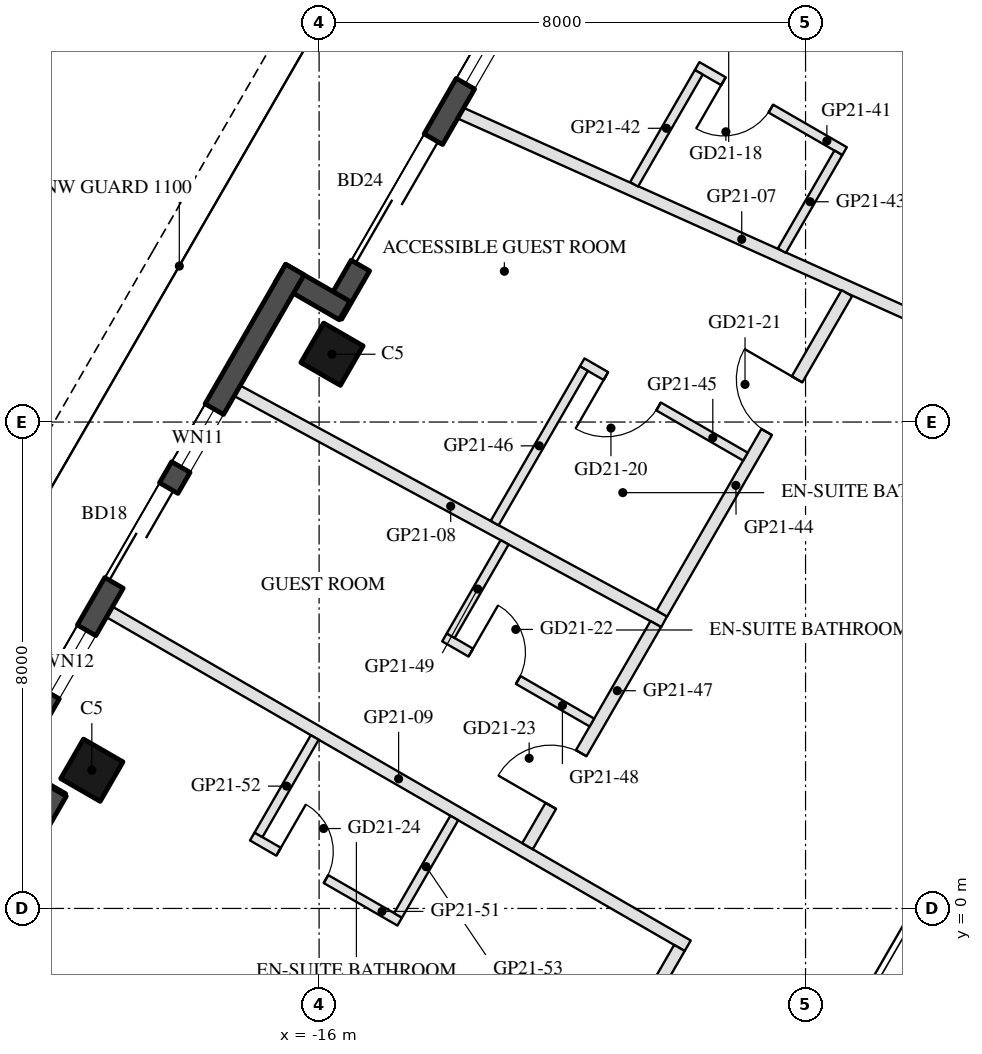
"""IFC4 building model, lengths in metres.
Left out: names, types, materials, properties, quantities, classifications, styles, units other than length and angle.
Written with IfcOpenShell. Run it as: python <this file> out.ifc"""

import sys

from ifc_helpers import new_model, si_unit, direction, frame, frame_2d, origin, origin_2d, place, context, subcontext, project, spatial, rectangle, hollow_rectangle, extrude, element, fill, save


model = new_model("IFC4")
c1 = context("Model", 3, precision=1e-05, world=origin(), true_north=direction((0.0, 1.0)))
c2 = subcontext(c1, "Body", "Model", "MODEL_VIEW")
j1 = project(units=[si_unit("LENGTHUNIT", "METRE"), si_unit("PLANEANGLEUNIT", "RADIAN")], contexts=[c1])
p1 = place(None, origin())
s1 = spatial("IfcSite", under=j1, at=p1, CompositionType="ELEMENT")
p2 = place(p1, origin())
s2 = spatial("IfcBuilding", under=s1, at=p2, CompositionType="ELEMENT")
p3 = place(p2, frame((0.0, 0.0, 216.9)))
s3 = spatial("IfcBuildingStorey", under=s2, at=p3, CompositionType="ELEMENT", Elevation=216.9)
for number, where, z_axis, x_axis in (
    (1, (-15.788, 9.115, 0.0), (0.0, 0.0, 1.0), (0.5, 0.866, 0.0)),
    (2, (-19.738, 2.273, 0.0), (0.0, 0.0, 1.0), (0.5, 0.866, 0.0)),
):
    element("IfcColumn", number, at=place(p3, frame(where, z_axis=z_axis, x_axis=x_axis)), inside=s3, PredefinedType="COLUMN", context=c2, shape_type="SweptSolid", body=[
        extrude(hollow_rectangle(XDim=0.75, YDim=0.75, WallThickness=0.035, at=origin_2d()), origin(), (0.0, 0.0, 1.0), 3.7),
    ])
p4 = place(p3, frame((-12.409, 15.617, 0.0), z_axis=(0.0, 0.0, 1.0), x_axis=(-0.500003597184, -0.866023326939, 0.0)))
e3 = element("IfcWall", 3, at=p4, inside=s3, PredefinedType="SOLIDWALL", context=c2, shape_type="SweptSolid", body=[
    extrude(rectangle(XDim=6.74, YDim=0.35, at=frame_2d((3.37, 0.0))), origin(), (0.0, 0.0, 1.0), 3.55),
])
p5 = place(p4, frame((0.77, 0.0, 0.3)))
e4 = element("IfcOpeningElement", 4, at=p5, cuts=e3, PredefinedType="OPENING", context=c2, shape_type="SweptSolid", body=[
    extrude(rectangle(XDim=1.6, YDim=2.65, at=frame_2d((0.8, 1.325))), frame((0.0, 0.185, 0.0), z_axis=(0.0, -1.0, 0.0), x_axis=(1.0, 0.0, 0.0)), (0.0, 0.0, 1.0), 0.37),
])
p6 = place(p4, frame((3.424, 0.0, 0.0)))
e5 = element("IfcOpeningElement", 5, at=p6, cuts=e3, PredefinedType="OPENING", context=c2, shape_type="SweptSolid", body=[
    extrude(rectangle(XDim=2.4, YDim=2.4, at=frame_2d((1.2, 1.2))), frame((0.0, 0.185, 0.0), z_axis=(0.0, -1.0, 0.0), x_axis=(1.0, 0.0, 0.0)), (0.0, 0.0, 1.0), 0.37),
])
p7 = place(p3, frame((-15.581, 9.833, 0.0), z_axis=(0.0, 0.0, 1.0), x_axis=(-0.866055662726, 0.499947586314, 0.0)))
e6 = element("IfcWall", 6, at=p7, inside=s3, PredefinedType="SOLIDWALL", context=c2, shape_type="SweptSolid", body=[
    extrude(rectangle(XDim=1.22, YDim=0.35, at=frame_2d((0.61, 0.0))), origin(), (0.0, 0.0, 1.0), 3.55),
])
p8 = place(p3, frame((-16.398, 10.507, 0.0), z_axis=(0.0, 0.0, 1.0), x_axis=(-0.499999142773, -0.866025898704, 0.0)))
e7 = element("IfcWall", 7, at=p8, inside=s3, PredefinedType="SOLIDWALL", context=c2, shape_type="SweptSolid", body=[
    extrude(rectangle(XDim=9.7, YDim=0.35, at=frame_2d((4.85, 0.0))), origin(), (0.0, 0.0, 1.0), 3.55),
])
p9 = place(p8, frame((4.149, 0.0, 0.0)))
e8 = element("IfcOpeningElement", 8, at=p9, cuts=e7, PredefinedType="OPENING", context=c2, shape_type="SweptSolid", body=[
    extrude(rectangle(XDim=1.8, YDim=2.4, at=frame_2d((0.9, 1.2))), frame((0.0, 0.185, 0.0), z_axis=(0.0, -1.0, 0.0), x_axis=(1.0, 0.0, 0.0)), (0.0, 0.0, 1.0), 0.37),
])
p10 = place(p8, frame((2.65, 0.0, 0.3)))
e9 = element("IfcOpeningElement", 9, at=p10, cuts=e7, PredefinedType="OPENING", context=c2, shape_type="SweptSolid", body=[
    extrude(rectangle(XDim=1.1, YDim=2.65, at=frame_2d((0.55, 1.325))), frame((0.0, 0.185, 0.0), z_axis=(0.0, -1.0, 0.0), x_axis=(1.0, 0.0, 0.0)), (0.0, 0.0, 1.0), 0.37),
])
p11 = place(p8, frame((6.85, 0.0, 0.3)))
e10 = element("IfcOpeningElement", 10, at=p11, cuts=e7, PredefinedType="OPENING", context=c2, shape_type="SweptSolid", body=[
    extrude(rectangle(XDim=1.2, YDim=2.65, at=frame_2d((0.6, 1.325))), frame((0.0, 0.185, 0.0), z_axis=(0.0, -1.0, 0.0), x_axis=(1.0, 0.0, 0.0)), (0.0, 0.0, 1.0), 0.37),
])
p12 = place(p3, frame((-21.312, 2.346, 0.0), z_axis=(0.0, 0.0, 1.0), x_axis=(0.866005645448, -0.500034220881, 0.0)))
e11 = element("IfcWall", 11, at=p12, inside=s3, PredefinedType="SOLIDWALL", context=c2, shape_type="SweptSolid", body=[
    extrude(rectangle(XDim=1.22, YDim=0.35, at=frame_2d((0.61, 0.0))), origin(), (0.0, 0.0, 1.0), 3.55),
])
p13 = place(p3, frame((-20.309, 1.934, 0.0), z_axis=(0.0, 0.0, 1.0), x_axis=(-0.499992114976, -0.866029956157, 0.0)))
e12 = element("IfcWall", 12, at=p13, inside=s3, PredefinedType="SOLIDWALL", context=c2, shape_type="SweptSolid", body=[
    extrude(rectangle(XDim=6.74, YDim=0.35, at=frame_2d((3.37, 0.0))), origin(), (0.0, 0.0, 1.0), 3.55),
])
p14 = place(p13, frame((0.77, 0.0, 0.0)))
e13 = element("IfcOpeningElement", 13, at=p14, cuts=e12, PredefinedType="OPENING", context=c2, shape_type="SweptSolid", body=[
    extrude(rectangle(XDim=2.4, YDim=2.4, at=frame_2d((1.2, 1.2))), frame((0.0, 0.185, 0.0), z_axis=(0.0, -1.0, 0.0), x_axis=(1.0, 0.0, 0.0)), (0.0, 0.0, 1.0), 0.37),
])
p15 = place(p13, frame((3.47, 0.0, 0.3)))
e14 = element("IfcOpeningElement", 14, at=p15, cuts=e12, PredefinedType="OPENING", context=c2, shape_type="SweptSolid", body=[
    extrude(rectangle(XDim=2.9, YDim=2.65, at=frame_2d((1.45, 1.325))), frame((0.0, 0.185, 0.0), z_axis=(0.0, -1.0, 0.0), x_axis=(1.0, 0.0, 0.0)), (0.0, 0.0, 1.0), 0.37),
])
p16 = place(p3, frame((-13.672, 13.08, 0.0), z_axis=(0.0, 0.0, 1.0), x_axis=(0.912311972773, -0.409495866077, 0.0)))
e15 = element("IfcWall", 15, at=p16, inside=s3, PredefinedType="PARTITIONING", context=c2, shape_type="SweptSolid", body=[
    extrude(rectangle(XDim=10.132, YDim=0.2, at=frame_2d((5.066, 0.0))), origin(), (0.0, 0.0, 1.0), 3.06),
])
p17 = place(p3, frame((-17.347, 8.514, 0.0), z_axis=(0.0, 0.0, 1.0), x_axis=(0.879604495132, -0.475705720109, 0.0)))
e16 = element("IfcWall", 16, at=p17, inside=s3, PredefinedType="PARTITIONING", context=c2, shape_type="SweptSolid", body=[
    extrude(rectangle(XDim=7.983, YDim=0.2, at=frame_2d((3.992, 0.0))), origin(), (0.0, 0.0, 1.0), 3.06),
])
p18 = place(p3, frame((-19.447, 4.877, 0.0), z_axis=(0.0, 0.0, 1.0), x_axis=(0.866027479907, -0.499996404033, 0.0)))
e17 = element("IfcWall", 17, at=p18, inside=s3, PredefinedType="PARTITIONING", context=c2, shape_type="SweptSolid", body=[
    extrude(rectangle(XDim=10.98, YDim=0.2, at=frame_2d((5.49, 0.0))), origin(), (0.0, 0.0, 1.0), 3.06),
])
p19 = place(p3, frame((-7.358, 12.455, 0.0), z_axis=(0.0, 0.0, 1.0), x_axis=(-0.866034573852, 0.49998411664, 0.0)))
e18 = element("IfcWall", 18, at=p19, inside=s3, PredefinedType="PARTITIONING", context=c2, shape_type="SweptSolid", body=[
    extrude(rectangle(XDim=2.8, YDim=0.15, at=frame_2d((1.4, 0.0))), origin(), (0.0, 0.0, 1.0), 3.55),
])
p20 = place(p19, frame((1.4, 0.0, 0.0)))
e19 = element("IfcOpeningElement", 19, at=p20, cuts=e18, PredefinedType="OPENING", context=c2, shape_type="SweptSolid", body=[
    extrude(rectangle(XDim=0.9, YDim=2.1, at=frame_2d((0.45, 1.05))), frame((0.0, 0.085, 0.0), z_axis=(0.0, -1.0, 0.0), x_axis=(1.0, 0.0, 0.0)), (0.0, 0.0, 1.0), 0.17),
])
p21 = place(p3, frame((-9.756, 13.752, 0.0), z_axis=(0.0, 0.0, 1.0), x_axis=(-0.50001378257, -0.866017446268, 0.0)))
e20 = element("IfcWall", 20, at=p21, inside=s3, PredefinedType="PARTITIONING", context=c2, shape_type="SweptSolid", body=[
    extrude(rectangle(XDim=2.128, YDim=0.15, at=frame_2d((1.064, 0.0))), origin(), (0.0, 0.0, 1.0), 3.55),
])
p22 = place(p3, frame((-7.461, 12.427, 0.0), z_axis=(0.0, 0.0, 1.0), x_axis=(-0.500025795397, -0.866010510293, 0.0)))
e21 = element("IfcWall", 21, at=p22, inside=s3, PredefinedType="PARTITIONING", context=c2, shape_type="SweptSolid", body=[
    extrude(rectangle(XDim=1.858, YDim=0.15, at=frame_2d((0.929, 0.0))), origin(), (0.0, 0.0, 1.0), 3.55),
])
p23 = place(p3, frame((-10.363, 4.851, 0.0), z_axis=(0.0, 0.0, 1.0), x_axis=(0.50000147882, 0.866024549986, 0.0)))
e22 = element("IfcWall", 22, at=p23, inside=s3, PredefinedType="PARTITIONING", context=c2, shape_type="SweptSolid", body=[
    extrude(rectangle(XDim=6.084, YDim=0.2, at=frame_2d((3.042, 0.0))), origin(), (0.0, 0.0, 1.0), 2.95),
])
p24 = place(p23, frame((3.447, 0.0, 0.0)))
e23 = element("IfcOpeningElement", 23, at=p24, cuts=e22, PredefinedType="OPENING", context=c2, shape_type="SweptSolid", body=[
    extrude(rectangle(XDim=1.0, YDim=2.1, at=frame_2d((0.5, 1.05))), frame((0.0, 0.11, 0.0), z_axis=(0.0, -1.0, 0.0), x_axis=(1.0, 0.0, 0.0)), (0.0, 0.0, 1.0), 0.22),
])
p25 = place(p3, frame((-8.989, 7.431, 0.0), z_axis=(0.0, 0.0, 1.0), x_axis=(-0.86600983753, 0.500026960575, 0.0)))
e24 = element("IfcWall", 24, at=p25, inside=s3, PredefinedType="PARTITIONING", context=c2, shape_type="SweptSolid", body=[
    extrude(rectangle(XDim=3.1, YDim=0.15, at=frame_2d((1.55, 0.0))), origin(), (0.0, 0.0, 1.0), 3.55),
])
p26 = place(p25, frame((1.65, 0.0, 0.0)))
e25 = element("IfcOpeningElement", 25, at=p26, cuts=e24, PredefinedType="OPENING", context=c2, shape_type="SweptSolid", body=[
    extrude(rectangle(XDim=1.0, YDim=2.1, at=frame_2d((0.5, 1.05))), frame((0.0, 0.085, 0.0), z_axis=(0.0, -1.0, 0.0), x_axis=(1.0, 0.0, 0.0)), (0.0, 0.0, 1.0), 0.17),
])
p27 = place(p3, frame((-11.646, 8.879, 0.0), z_axis=(0.0, 0.0, 1.0), x_axis=(-0.499996155683, -0.86602762329, 0.0)))
e26 = element("IfcWall", 26, at=p27, inside=s3, PredefinedType="PARTITIONING", context=c2, shape_type="SweptSolid", body=[
    extrude(rectangle(XDim=2.934, YDim=0.15, at=frame_2d((1.467, 0.0))), origin(), (0.0, 0.0, 1.0), 2.95),
])
p28 = place(p3, frame((-12.573, 1.023, 0.0), z_axis=(0.0, 0.0, 1.0), x_axis=(0.499991256393, 0.86603045185, 0.0)))
e27 = element("IfcWall", 27, at=p28, inside=s3, PredefinedType="PARTITIONING", context=c2, shape_type="SweptSolid", body=[
    extrude(rectangle(XDim=4.219, YDim=0.2, at=frame_2d((2.11, 0.0))), origin(), (0.0, 0.0, 1.0), 2.95),
])
p29 = place(p28, frame((0.766, 0.0, 0.0)))
e28 = element("IfcOpeningElement", 28, at=p29, cuts=e27, PredefinedType="OPENING", context=c2, shape_type="SweptSolid", body=[
    extrude(rectangle(XDim=1.0, YDim=2.1, at=frame_2d((0.5, 1.05))), frame((0.0, 0.11, 0.0), z_axis=(0.0, -1.0, 0.0), x_axis=(1.0, 0.0, 0.0)), (0.0, 0.0, 1.0), 0.22),
])
p30 = place(p3, frame((-13.938, 4.458, 0.0), z_axis=(0.0, 0.0, 1.0), x_axis=(0.865996816683, -0.500049511043, 0.0)))
e29 = element("IfcWall", 29, at=p30, inside=s3, PredefinedType="PARTITIONING", context=c2, shape_type="SweptSolid", body=[
    extrude(rectangle(XDim=2.8, YDim=0.15, at=frame_2d((1.4, 0.0))), origin(), (0.0, 0.0, 1.0), 3.55),
])
p31 = place(p30, frame((0.5, 0.0, 0.0)))
e30 = element("IfcOpeningElement", 30, at=p31, cuts=e29, PredefinedType="OPENING", context=c2, shape_type="SweptSolid", body=[
    extrude(rectangle(XDim=0.9, YDim=2.1, at=frame_2d((0.45, 1.05))), frame((0.0, 0.085, 0.0), z_axis=(0.0, -1.0, 0.0), x_axis=(1.0, 0.0, 0.0)), (0.0, 0.0, 1.0), 0.17),
])
p32 = place(p3, frame((-12.949, 6.022, 0.0), z_axis=(0.0, 0.0, 1.0), x_axis=(-0.499913039621, -0.866075604562, 0.0)))
e31 = element("IfcWall", 31, at=p32, inside=s3, PredefinedType="PARTITIONING", context=c2, shape_type="SweptSolid", body=[
    extrude(rectangle(XDim=1.774, YDim=0.15, at=frame_2d((0.887, 0.0))), origin(), (0.0, 0.0, 1.0), 3.55),
])
p33 = place(p3, frame((-12.269, -4.45, 0.0), z_axis=(0.0, 0.0, 1.0), x_axis=(0.499998569178, 0.866026229868, 0.0)))
e32 = element("IfcWall", 32, at=p33, inside=s3, PredefinedType="PARTITIONING", context=c2, shape_type="SweptSolid", body=[
    extrude(rectangle(XDim=4.388, YDim=0.2, at=frame_2d((2.194, 0.0))), origin(), (0.0, 0.0, 1.0), 2.95),
])
p34 = place(p33, frame((1.694, 0.0, 0.0)))
e33 = element("IfcOpeningElement", 33, at=p34, cuts=e32, PredefinedType="OPENING", context=c2, shape_type="SweptSolid", body=[
    extrude(rectangle(XDim=1.0, YDim=2.1, at=frame_2d((0.5, 1.05))), frame((0.0, 0.11, 0.0), z_axis=(0.0, -1.0, 0.0), x_axis=(1.0, 0.0, 0.0)), (0.0, 0.0, 1.0), 0.22),
])
p35 = place(p3, frame((-17.099, 1.183, 0.0), z_axis=(0.0, 0.0, 1.0), x_axis=(0.866056369097, -0.49994636267, 0.0)))
e34 = element("IfcWall", 34, at=p35, inside=s3, PredefinedType="PARTITIONING", context=c2, shape_type="SweptSolid", body=[
    extrude(rectangle(XDim=2.8, YDim=0.15, at=frame_2d((1.4, 0.0))), origin(), (0.0, 0.0, 1.0), 3.55),
])
p36 = place(p35, frame((0.5, 0.0, 0.0)))
e35 = element("IfcOpeningElement", 35, at=p36, cuts=e34, PredefinedType="OPENING", context=c2, shape_type="SweptSolid", body=[
    extrude(rectangle(XDim=0.9, YDim=2.1, at=frame_2d((0.45, 1.05))), frame((0.0, 0.085, 0.0), z_axis=(0.0, -1.0, 0.0), x_axis=(1.0, 0.0, 0.0)), (0.0, 0.0, 1.0), 0.17),
])
p37 = place(p3, frame((-16.072, 2.813, 0.0), z_axis=(0.0, 0.0, 1.0), x_axis=(-0.500042316284, -0.866000971088, 0.0)))
e36 = element("IfcWall", 36, at=p37, inside=s3, PredefinedType="PARTITIONING", context=c2, shape_type="SweptSolid", body=[
    extrude(rectangle(XDim=1.85, YDim=0.15, at=frame_2d((0.925, 0.0))), origin(), (0.0, 0.0, 1.0), 3.55),
])
p38 = place(p3, frame((-13.777, 1.488, 0.0), z_axis=(0.0, 0.0, 1.0), x_axis=(-0.499985172903, -0.866033964044, 0.0)))
e37 = element("IfcWall", 37, at=p38, inside=s3, PredefinedType="PARTITIONING", context=c2, shape_type="SweptSolid", body=[
    extrude(rectangle(XDim=1.85, YDim=0.15, at=frame_2d((0.925, 0.0))), origin(), (0.0, 0.0, 1.0), 3.55),
])
p39 = place(p5, origin())
e38 = element("IfcWindow", 38, at=p39, inside=s3, PartitioningType="SINGLE_PANEL", PredefinedType="WINDOW", context=c2, shape_type="SweptSolid", body=[
    extrude(rectangle(XDim=1.6, YDim=2.65, at=frame_2d((0.8, 1.325))), frame((0.0, 0.03, 0.0), z_axis=(0.0, -1.0, 0.0), x_axis=(1.0, 0.0, 0.0)), (0.0, 0.0, 1.0), 0.06),
])
fill(e4, e38)
p40 = place(p6, frame((2.4, 0.0, 0.0), z_axis=(0.0, 0.0, 1.0), x_axis=(-1.0, 0.0, 0.0)))
e39 = element("IfcDoor", 39, at=p40, inside=s3, OperationType="SLIDING_TO_LEFT", PredefinedType="DOOR", context=c2, shape_type="SweptSolid", body=[
    extrude(rectangle(XDim=2.4, YDim=2.4, at=frame_2d((1.2, 1.2))), frame((0.0, 0.025, 0.0), z_axis=(0.0, -1.0, 0.0), x_axis=(1.0, 0.0, 0.0)), (0.0, 0.0, 1.0), 0.05),
])
fill(e5, e39)
p41 = place(p9, frame((1.8, 0.0, 0.0), z_axis=(0.0, 0.0, 1.0), x_axis=(-1.0, 0.0, 0.0)))
e40 = element("IfcDoor", 40, at=p41, inside=s3, OperationType="SLIDING_TO_LEFT", PredefinedType="DOOR", context=c2, shape_type="SweptSolid", body=[
    extrude(rectangle(XDim=1.8, YDim=2.4, at=frame_2d((0.9, 1.2))), frame((0.0, 0.025, 0.0), z_axis=(0.0, -1.0, 0.0), x_axis=(1.0, 0.0, 0.0)), (0.0, 0.0, 1.0), 0.05),
])
fill(e8, e40)
p42 = place(p10, origin())
e41 = element("IfcWindow", 41, at=p42, inside=s3, PartitioningType="SINGLE_PANEL", PredefinedType="WINDOW", context=c2, shape_type="SweptSolid", body=[
    extrude(rectangle(XDim=1.1, YDim=2.65, at=frame_2d((0.55, 1.325))), frame((0.0, 0.03, 0.0), z_axis=(0.0, -1.0, 0.0), x_axis=(1.0, 0.0, 0.0)), (0.0, 0.0, 1.0), 0.06),
])
fill(e9, e41)
p43 = place(p11, origin())
e42 = element("IfcWindow", 42, at=p43, inside=s3, PartitioningType="SINGLE_PANEL", PredefinedType="WINDOW", context=c2, shape_type="SweptSolid", body=[
    extrude(rectangle(XDim=1.2, YDim=2.65, at=frame_2d((0.6, 1.325))), frame((0.0, 0.03, 0.0), z_axis=(0.0, -1.0, 0.0), x_axis=(1.0, 0.0, 0.0)), (0.0, 0.0, 1.0), 0.06),
])
fill(e10, e42)
p44 = place(p20, origin())
e43 = element("IfcDoor", 43, at=p44, inside=s3, OperationType="SINGLE_SWING_RIGHT", PredefinedType="DOOR", context=c2, shape_type="SweptSolid", body=[
    extrude(rectangle(XDim=0.9, YDim=2.1, at=frame_2d((0.45, 1.05))), frame((0.0, 0.025, 0.0), z_axis=(0.0, -1.0, 0.0), x_axis=(1.0, 0.0, 0.0)), (0.0, 0.0, 1.0), 0.05),
])
fill(e19, e43)
p45 = place(p26, origin())
e44 = element("IfcDoor", 44, at=p45, inside=s3, OperationType="SINGLE_SWING_RIGHT", PredefinedType="DOOR", context=c2, shape_type="SweptSolid", body=[
    extrude(rectangle(XDim=1.0, YDim=2.1, at=frame_2d((0.5, 1.05))), frame((0.0, 0.025, 0.0), z_axis=(0.0, -1.0, 0.0), x_axis=(1.0, 0.0, 0.0)), (0.0, 0.0, 1.0), 0.05),
])
fill(e25, e44)
p46 = place(p24, origin())
e45 = element("IfcDoor", 45, at=p46, inside=s3, OperationType="SINGLE_SWING_RIGHT", PredefinedType="DOOR", context=c2, shape_type="SweptSolid", body=[
    extrude(rectangle(XDim=1.0, YDim=2.1, at=frame_2d((0.5, 1.05))), frame((0.0, 0.025, 0.0), z_axis=(0.0, -1.0, 0.0), x_axis=(1.0, 0.0, 0.0)), (0.0, 0.0, 1.0), 0.05),
])
fill(e23, e45)
p47 = place(p31, origin())
e46 = element("IfcDoor", 46, at=p47, inside=s3, OperationType="SINGLE_SWING_LEFT", PredefinedType="DOOR", context=c2, shape_type="SweptSolid", body=[
    extrude(rectangle(XDim=0.9, YDim=2.1, at=frame_2d((0.45, 1.05))), frame((0.0, 0.025, 0.0), z_axis=(0.0, -1.0, 0.0), x_axis=(1.0, 0.0, 0.0)), (0.0, 0.0, 1.0), 0.05),
])
fill(e30, e46)
p48 = place(p29, origin())
e47 = element("IfcDoor", 47, at=p48, inside=s3, OperationType="SINGLE_SWING_LEFT", PredefinedType="DOOR", context=c2, shape_type="SweptSolid", body=[
    extrude(rectangle(XDim=1.0, YDim=2.1, at=frame_2d((0.5, 1.05))), frame((0.0, 0.025, 0.0), z_axis=(0.0, -1.0, 0.0), x_axis=(1.0, 0.0, 0.0)), (0.0, 0.0, 1.0), 0.05),
])
fill(e28, e47)
p49 = place(p36, origin())
e48 = element("IfcDoor", 48, at=p49, inside=s3, OperationType="SINGLE_SWING_LEFT", PredefinedType="DOOR", context=c2, shape_type="SweptSolid", body=[
    extrude(rectangle(XDim=0.9, YDim=2.1, at=frame_2d((0.45, 1.05))), frame((0.0, 0.025, 0.0), z_axis=(0.0, -1.0, 0.0), x_axis=(1.0, 0.0, 0.0)), (0.0, 0.0, 1.0), 0.05),
])
fill(e35, e48)
save(model, sys.argv[1])
